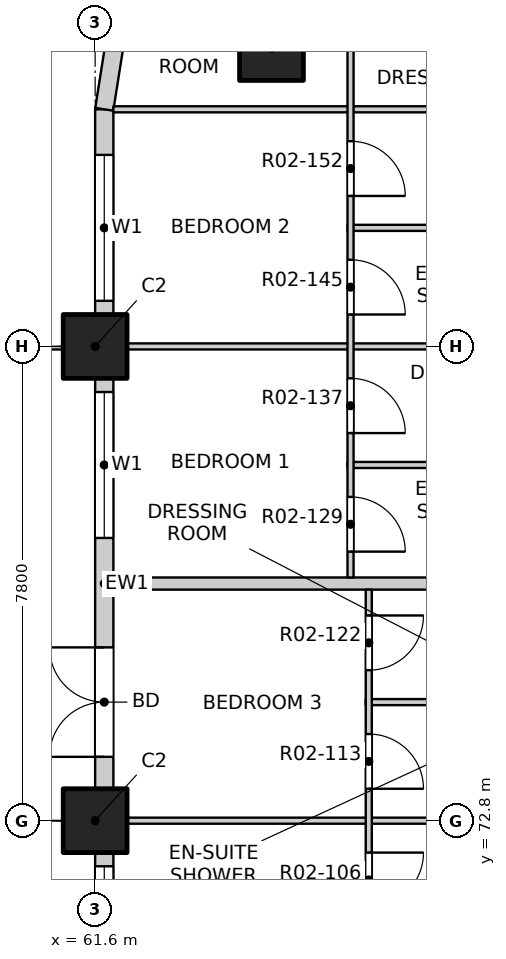
"""IFC4 building model, lengths in metres.
Left out: names, types, materials, properties, quantities, classifications, styles, units other than length and angle.
Written with IfcOpenShell. Run it as: python <this file> out.ifc"""

import sys

from ifc_helpers import new_model, si_unit, direction, frame, frame_2d, origin, origin_2d, place, context, subcontext, project, spatial, rectangle, extrude, element, fill, save


model = new_model("IFC4")
c1 = context("Model", 3, precision=1e-05, world=origin(), true_north=direction((0.0, 1.0)))
c2 = subcontext(c1, "Body", "Model", "MODEL_VIEW")
j1 = project(units=[si_unit("LENGTHUNIT", "METRE"), si_unit("PLANEANGLEUNIT", "RADIAN")], contexts=[c1])
p1 = place(None, origin())
s1 = spatial("IfcSite", under=j1, at=p1, CompositionType="ELEMENT")
p2 = place(p1, origin())
s2 = spatial("IfcBuilding", under=s1, at=p2, CompositionType="ELEMENT")
p3 = place(p2, frame((0.0, 0.0, 29.7)))
s3 = spatial("IfcBuildingStorey", under=s2, at=p3, CompositionType="ELEMENT", Elevation=29.7)
for number, where, z_axis, x_axis in (
    (1, (64.5, 85.5, -0.25), (0.0, 0.0, 1.0), (1.0, 0.0, 0.0)),
    (2, (61.6, 72.8, -0.25), (0.0, 0.0, 1.0), (1.0, 0.0, 0.0)),
    (3, (61.6, 80.6, -0.25), (0.0, 0.0, 1.0), (1.0, 0.0, 0.0)),
):
    element("IfcColumn", number, at=place(p3, frame(where, z_axis=z_axis, x_axis=x_axis)), inside=s3, PredefinedType="COLUMN", context=c2, shape_type="SweptSolid", body=[
        extrude(rectangle(XDim=1.05, YDim=1.05, at=origin_2d()), origin(), (0.0, 0.0, 1.0), 3.4),
    ])
p4 = place(p3, frame((61.75, 65.525, 0.0), z_axis=(0.0, 0.0, 1.0), x_axis=(0.0, 1.0, 0.0)))
e4 = element("IfcWall", 4, at=p4, inside=s3, PredefinedType="SOLIDWALL", context=c2, shape_type="SweptSolid", body=[
    extrude(rectangle(XDim=6.75, YDim=0.3, at=frame_2d((3.375, 0.0))), origin(), (0.0, 0.0, 1.0), 2.7),
])
p5 = place(p4, frame((0.525, 0.0, 0.0)))
e5 = element("IfcOpeningElement", 5, at=p5, cuts=e4, PredefinedType="OPENING", context=c2, shape_type="SweptSolid", body=[
    extrude(rectangle(XDim=1.8, YDim=2.4, at=frame_2d((0.9, 1.2))), frame((0.0, 0.16, 0.0), z_axis=(0.0, -1.0, 0.0), x_axis=(1.0, 0.0, 0.0)), (0.0, 0.0, 1.0), 0.32),
])
p6 = place(p4, frame((4.125, 0.0, 0.9)))
e6 = element("IfcOpeningElement", 6, at=p6, cuts=e4, PredefinedType="OPENING", context=c2, shape_type="SweptSolid", body=[
    extrude(rectangle(XDim=2.4, YDim=1.8, at=frame_2d((1.2, 0.9))), frame((0.0, 0.16, 0.0), z_axis=(0.0, -1.0, 0.0), x_axis=(1.0, 0.0, 0.0)), (0.0, 0.0, 1.0), 0.32),
])
p7 = place(p3, frame((61.75, 73.325, 0.0), z_axis=(0.0, 0.0, 1.0), x_axis=(0.0, 1.0, 0.0)))
e7 = element("IfcWall", 7, at=p7, inside=s3, PredefinedType="SOLIDWALL", context=c2, shape_type="SweptSolid", body=[
    extrude(rectangle(XDim=6.75, YDim=0.3, at=frame_2d((3.375, 0.0))), origin(), (0.0, 0.0, 1.0), 2.7),
])
p8 = place(p7, frame((0.525, 0.0, 0.0)))
e8 = element("IfcOpeningElement", 8, at=p8, cuts=e7, PredefinedType="OPENING", context=c2, shape_type="SweptSolid", body=[
    extrude(rectangle(XDim=1.8, YDim=2.4, at=frame_2d((0.9, 1.2))), frame((0.0, 0.16, 0.0), z_axis=(0.0, -1.0, 0.0), x_axis=(1.0, 0.0, 0.0)), (0.0, 0.0, 1.0), 0.32),
])
p9 = place(p7, frame((4.125, 0.0, 0.9)))
e9 = element("IfcOpeningElement", 9, at=p9, cuts=e7, PredefinedType="OPENING", context=c2, shape_type="SweptSolid", body=[
    extrude(rectangle(XDim=2.4, YDim=1.8, at=frame_2d((1.2, 0.9))), frame((0.0, 0.16, 0.0), z_axis=(0.0, -1.0, 0.0), x_axis=(1.0, 0.0, 0.0)), (0.0, 0.0, 1.0), 0.32),
])
p10 = place(p3, frame((61.75, 81.125, 0.0), z_axis=(0.0, 0.0, 1.0), x_axis=(0.0, 1.0, 0.0)))
e10 = element("IfcWall", 10, at=p10, inside=s3, PredefinedType="SOLIDWALL", context=c2, shape_type="SweptSolid", body=[
    extrude(rectangle(XDim=3.375, YDim=0.3, at=frame_2d((1.688, 0.0))), origin(), (0.0, 0.0, 1.0), 2.7),
])
p11 = place(p10, frame((0.225, 0.0, 0.9)))
e11 = element("IfcOpeningElement", 11, at=p11, cuts=e10, PredefinedType="OPENING", context=c2, shape_type="SweptSolid", body=[
    extrude(rectangle(XDim=2.4, YDim=1.8, at=frame_2d((1.2, 0.9))), frame((0.0, 0.16, 0.0), z_axis=(0.0, -1.0, 0.0), x_axis=(1.0, 0.0, 0.0)), (0.0, 0.0, 1.0), 0.32),
])
p12 = place(p3, frame((61.934, 85.659, 0.0), z_axis=(0.0, 0.0, 1.0), x_axis=(-0.156496880861, -0.987678452879, 0.0)))
e12 = element("IfcWall", 12, at=p12, inside=s3, PredefinedType="SOLIDWALL", context=c2, shape_type="SweptSolid", body=[
    extrude(rectangle(XDim=1.173, YDim=0.3, at=frame_2d((0.586, 0.0))), origin(), (0.0, 0.0, 1.0), 2.7),
])
p13 = place(p3, frame((61.9, 72.8, 0.0), z_axis=(0.0, 0.0, 1.0), x_axis=(1.0, 0.0, 0.0)))
e13 = element("IfcWall", 13, at=p13, inside=s3, PredefinedType="PARTITIONING", context=c2, shape_type="SweptSolid", body=[
    extrude(rectangle(XDim=7.55, YDim=0.1, at=frame_2d((3.775, 0.0))), origin(), (0.0, 0.0, 1.0), 2.55),
])
p14 = place(p3, frame((66.05, 74.75, 0.0), z_axis=(0.0, 0.0, 1.0), x_axis=(1.0, 0.0, 0.0)))
e14 = element("IfcWall", 14, at=p14, inside=s3, PredefinedType="PARTITIONING", context=c2, shape_type="SweptSolid", body=[
    extrude(rectangle(XDim=3.4, YDim=0.1, at=frame_2d((1.7, 0.0))), origin(), (0.0, 0.0, 1.0), 3.15),
])
p15 = place(p3, frame((61.9, 76.7, 0.0), z_axis=(0.0, 0.0, 1.0), x_axis=(1.0, 0.0, 0.0)))
e15 = element("IfcWall", 15, at=p15, inside=s3, PredefinedType="PARTITIONING", context=c2, shape_type="SweptSolid", body=[
    extrude(rectangle(XDim=11.5, YDim=0.2, at=frame_2d((5.75, 0.0))), origin(), (0.0, 0.0, 1.0), 3.15),
])
p16 = place(p3, frame((65.75, 78.65, 0.0), z_axis=(0.0, 0.0, 1.0), x_axis=(1.0, 0.0, 0.0)))
e16 = element("IfcWall", 16, at=p16, inside=s3, PredefinedType="PARTITIONING", context=c2, shape_type="SweptSolid", body=[
    extrude(rectangle(XDim=3.7, YDim=0.1, at=frame_2d((1.85, 0.0))), origin(), (0.0, 0.0, 1.0), 3.15),
])
p17 = place(p3, frame((61.9, 80.6, 0.0), z_axis=(0.0, 0.0, 1.0), x_axis=(1.0, 0.0, 0.0)))
e17 = element("IfcWall", 17, at=p17, inside=s3, PredefinedType="PARTITIONING", context=c2, shape_type="SweptSolid", body=[
    extrude(rectangle(XDim=7.55, YDim=0.1, at=frame_2d((3.775, 0.0))), origin(), (0.0, 0.0, 1.0), 2.55),
])
p18 = place(p3, frame((65.75, 82.55, 0.0), z_axis=(0.0, 0.0, 1.0), x_axis=(1.0, 0.0, 0.0)))
e18 = element("IfcWall", 18, at=p18, inside=s3, PredefinedType="PARTITIONING", context=c2, shape_type="SweptSolid", body=[
    extrude(rectangle(XDim=3.7, YDim=0.1, at=frame_2d((1.85, 0.0))), origin(), (0.0, 0.0, 1.0), 3.15),
])
p19 = place(p3, frame((61.9, 84.5, 0.0), z_axis=(0.0, 0.0, 1.0), x_axis=(1.0, 0.0, 0.0)))
e19 = element("IfcWall", 19, at=p19, inside=s3, PredefinedType="PARTITIONING", context=c2, shape_type="SweptSolid", body=[
    extrude(rectangle(XDim=11.5, YDim=0.1, at=frame_2d((5.75, 0.0))), origin(), (0.0, 0.0, 1.0), 3.15),
])
p20 = place(p19, frame((7.965, 0.0, 0.0)))
e20 = element("IfcOpeningElement", 20, at=p20, cuts=e19, PredefinedType="OPENING", context=c2, shape_type="SweptSolid", body=[
    extrude(rectangle(XDim=0.9, YDim=2.1, at=frame_2d((0.45, 1.05))), frame((0.0, 0.06, 0.0), z_axis=(0.0, -1.0, 0.0), x_axis=(1.0, 0.0, 0.0)), (0.0, 0.0, 1.0), 0.12),
])
p21 = place(p3, frame((65.8, 76.8, 0.0), z_axis=(0.0, 0.0, 1.0), x_axis=(0.0, 1.0, 0.0)))
e21 = element("IfcWall", 21, at=p21, inside=s3, PredefinedType="PARTITIONING", context=c2, shape_type="SweptSolid", body=[
    extrude(rectangle(XDim=11.3, YDim=0.1, at=frame_2d((5.65, 0.0))), origin(), (0.0, 0.0, 1.0), 3.15),
])
p22 = place(p21, frame((0.425, 0.0, 0.0)))
e22 = element("IfcOpeningElement", 22, at=p22, cuts=e21, PredefinedType="OPENING", context=c2, shape_type="SweptSolid", body=[
    extrude(rectangle(XDim=0.9, YDim=2.1, at=frame_2d((0.45, 1.05))), frame((0.0, 0.06, 0.0), z_axis=(0.0, -1.0, 0.0), x_axis=(1.0, 0.0, 0.0)), (0.0, 0.0, 1.0), 0.12),
])
p23 = place(p21, frame((2.375, 0.0, 0.0)))
e23 = element("IfcOpeningElement", 23, at=p23, cuts=e21, PredefinedType="OPENING", context=c2, shape_type="SweptSolid", body=[
    extrude(rectangle(XDim=0.9, YDim=2.1, at=frame_2d((0.45, 1.05))), frame((0.0, 0.06, 0.0), z_axis=(0.0, -1.0, 0.0), x_axis=(1.0, 0.0, 0.0)), (0.0, 0.0, 1.0), 0.12),
])
p24 = place(p21, frame((4.325, 0.0, 0.0)))
e24 = element("IfcOpeningElement", 24, at=p24, cuts=e21, PredefinedType="OPENING", context=c2, shape_type="SweptSolid", body=[
    extrude(rectangle(XDim=0.9, YDim=2.1, at=frame_2d((0.45, 1.05))), frame((0.0, 0.06, 0.0), z_axis=(0.0, -1.0, 0.0), x_axis=(1.0, 0.0, 0.0)), (0.0, 0.0, 1.0), 0.12),
])
p25 = place(p21, frame((6.275, 0.0, 0.0)))
e25 = element("IfcOpeningElement", 25, at=p25, cuts=e21, PredefinedType="OPENING", context=c2, shape_type="SweptSolid", body=[
    extrude(rectangle(XDim=0.9, YDim=2.1, at=frame_2d((0.45, 1.05))), frame((0.0, 0.06, 0.0), z_axis=(0.0, -1.0, 0.0), x_axis=(1.0, 0.0, 0.0)), (0.0, 0.0, 1.0), 0.12),
])
p26 = place(p21, frame((9.05, 0.0, 0.0)))
e26 = element("IfcOpeningElement", 26, at=p26, cuts=e21, PredefinedType="OPENING", context=c2, shape_type="SweptSolid", body=[
    extrude(rectangle(XDim=1.2, YDim=2.1, at=frame_2d((0.6, 1.05))), frame((0.0, 0.06, 0.0), z_axis=(0.0, -1.0, 0.0), x_axis=(1.0, 0.0, 0.0)), (0.0, 0.0, 1.0), 0.12),
])
p27 = place(p3, frame((66.1, 41.9, 0.0), z_axis=(0.0, 0.0, 1.0), x_axis=(0.0, 1.0, 0.0)))
e27 = element("IfcWall", 27, at=p27, inside=s3, PredefinedType="PARTITIONING", context=c2, shape_type="SweptSolid", body=[
    extrude(rectangle(XDim=34.7, YDim=0.1, at=frame_2d((17.35, 0.0))), origin(), (0.0, 0.0, 1.0), 3.15),
])
p28 = place(p27, frame((1.05, 0.0, 0.0)))
e28 = element("IfcOpeningElement", 28, at=p28, cuts=e27, PredefinedType="OPENING", context=c2, shape_type="SweptSolid", body=[
    extrude(rectangle(XDim=1.2, YDim=2.1, at=frame_2d((0.6, 1.05))), frame((0.0, 0.06, 0.0), z_axis=(0.0, -1.0, 0.0), x_axis=(1.0, 0.0, 0.0)), (0.0, 0.0, 1.0), 0.12),
])
p29 = place(p27, frame((4.95, 0.0, 0.0)))
e29 = element("IfcOpeningElement", 29, at=p29, cuts=e27, PredefinedType="OPENING", context=c2, shape_type="SweptSolid", body=[
    extrude(rectangle(XDim=1.2, YDim=2.1, at=frame_2d((0.6, 1.05))), frame((0.0, 0.06, 0.0), z_axis=(0.0, -1.0, 0.0), x_axis=(1.0, 0.0, 0.0)), (0.0, 0.0, 1.0), 0.12),
])
p30 = place(p27, frame((8.025, 0.0, 0.0)))
e30 = element("IfcOpeningElement", 30, at=p30, cuts=e27, PredefinedType="OPENING", context=c2, shape_type="SweptSolid", body=[
    extrude(rectangle(XDim=0.9, YDim=2.1, at=frame_2d((0.45, 1.05))), frame((0.0, 0.06, 0.0), z_axis=(0.0, -1.0, 0.0), x_axis=(1.0, 0.0, 0.0)), (0.0, 0.0, 1.0), 0.12),
])
p31 = place(p27, frame((9.975, 0.0, 0.0)))
e31 = element("IfcOpeningElement", 31, at=p31, cuts=e27, PredefinedType="OPENING", context=c2, shape_type="SweptSolid", body=[
    extrude(rectangle(XDim=0.9, YDim=2.1, at=frame_2d((0.45, 1.05))), frame((0.0, 0.06, 0.0), z_axis=(0.0, -1.0, 0.0), x_axis=(1.0, 0.0, 0.0)), (0.0, 0.0, 1.0), 0.12),
])
p32 = place(p27, frame((12.75, 0.0, 0.0)))
e32 = element("IfcOpeningElement", 32, at=p32, cuts=e27, PredefinedType="OPENING", context=c2, shape_type="SweptSolid", body=[
    extrude(rectangle(XDim=1.2, YDim=2.1, at=frame_2d((0.6, 1.05))), frame((0.0, 0.06, 0.0), z_axis=(0.0, -1.0, 0.0), x_axis=(1.0, 0.0, 0.0)), (0.0, 0.0, 1.0), 0.12),
])
p33 = place(p27, frame((15.825, 0.0, 0.0)))
e33 = element("IfcOpeningElement", 33, at=p33, cuts=e27, PredefinedType="OPENING", context=c2, shape_type="SweptSolid", body=[
    extrude(rectangle(XDim=0.9, YDim=2.1, at=frame_2d((0.45, 1.05))), frame((0.0, 0.06, 0.0), z_axis=(0.0, -1.0, 0.0), x_axis=(1.0, 0.0, 0.0)), (0.0, 0.0, 1.0), 0.12),
])
p34 = place(p27, frame((17.775, 0.0, 0.0)))
e34 = element("IfcOpeningElement", 34, at=p34, cuts=e27, PredefinedType="OPENING", context=c2, shape_type="SweptSolid", body=[
    extrude(rectangle(XDim=0.9, YDim=2.1, at=frame_2d((0.45, 1.05))), frame((0.0, 0.06, 0.0), z_axis=(0.0, -1.0, 0.0), x_axis=(1.0, 0.0, 0.0)), (0.0, 0.0, 1.0), 0.12),
])
p35 = place(p27, frame((19.725, 0.0, 0.0)))
e35 = element("IfcOpeningElement", 35, at=p35, cuts=e27, PredefinedType="OPENING", context=c2, shape_type="SweptSolid", body=[
    extrude(rectangle(XDim=0.9, YDim=2.1, at=frame_2d((0.45, 1.05))), frame((0.0, 0.06, 0.0), z_axis=(0.0, -1.0, 0.0), x_axis=(1.0, 0.0, 0.0)), (0.0, 0.0, 1.0), 0.12),
])
p36 = place(p27, frame((21.675, 0.0, 0.0)))
e36 = element("IfcOpeningElement", 36, at=p36, cuts=e27, PredefinedType="OPENING", context=c2, shape_type="SweptSolid", body=[
    extrude(rectangle(XDim=0.9, YDim=2.1, at=frame_2d((0.45, 1.05))), frame((0.0, 0.06, 0.0), z_axis=(0.0, -1.0, 0.0), x_axis=(1.0, 0.0, 0.0)), (0.0, 0.0, 1.0), 0.12),
])
p37 = place(p27, frame((24.45, 0.0, 0.0)))
e37 = element("IfcOpeningElement", 37, at=p37, cuts=e27, PredefinedType="OPENING", context=c2, shape_type="SweptSolid", body=[
    extrude(rectangle(XDim=1.2, YDim=2.1, at=frame_2d((0.6, 1.05))), frame((0.0, 0.06, 0.0), z_axis=(0.0, -1.0, 0.0), x_axis=(1.0, 0.0, 0.0)), (0.0, 0.0, 1.0), 0.12),
])
p38 = place(p27, frame((27.525, 0.0, 0.0)))
e38 = element("IfcOpeningElement", 38, at=p38, cuts=e27, PredefinedType="OPENING", context=c2, shape_type="SweptSolid", body=[
    extrude(rectangle(XDim=0.9, YDim=2.1, at=frame_2d((0.45, 1.05))), frame((0.0, 0.06, 0.0), z_axis=(0.0, -1.0, 0.0), x_axis=(1.0, 0.0, 0.0)), (0.0, 0.0, 1.0), 0.12),
])
p39 = place(p27, frame((29.475, 0.0, 0.0)))
e39 = element("IfcOpeningElement", 39, at=p39, cuts=e27, PredefinedType="OPENING", context=c2, shape_type="SweptSolid", body=[
    extrude(rectangle(XDim=0.9, YDim=2.1, at=frame_2d((0.45, 1.05))), frame((0.0, 0.06, 0.0), z_axis=(0.0, -1.0, 0.0), x_axis=(1.0, 0.0, 0.0)), (0.0, 0.0, 1.0), 0.12),
])
p40 = place(p27, frame((31.425, 0.0, 0.0)))
e40 = element("IfcOpeningElement", 40, at=p40, cuts=e27, PredefinedType="OPENING", context=c2, shape_type="SweptSolid", body=[
    extrude(rectangle(XDim=0.9, YDim=2.1, at=frame_2d((0.45, 1.05))), frame((0.0, 0.06, 0.0), z_axis=(0.0, -1.0, 0.0), x_axis=(1.0, 0.0, 0.0)), (0.0, 0.0, 1.0), 0.12),
])
p41 = place(p27, frame((33.375, 0.0, 0.0)))
e41 = element("IfcOpeningElement", 41, at=p41, cuts=e27, PredefinedType="OPENING", context=c2, shape_type="SweptSolid", body=[
    extrude(rectangle(XDim=0.9, YDim=2.1, at=frame_2d((0.45, 1.05))), frame((0.0, 0.06, 0.0), z_axis=(0.0, -1.0, 0.0), x_axis=(1.0, 0.0, 0.0)), (0.0, 0.0, 1.0), 0.12),
])
p42 = place(p6, origin())
e42 = element("IfcWindow", 42, at=p42, inside=s3, PartitioningType="DOUBLE_PANEL_VERTICAL", PredefinedType="WINDOW", context=c2, shape_type="SweptSolid", body=[
    extrude(rectangle(XDim=2.4, YDim=1.8, at=frame_2d((1.2, 0.9))), frame((0.0, 0.03, 0.0), z_axis=(0.0, -1.0, 0.0), x_axis=(1.0, 0.0, 0.0)), (0.0, 0.0, 1.0), 0.06),
])
fill(e6, e42)
p43 = place(p8, origin())
e43 = element("IfcDoor", 43, at=p43, inside=s3, OperationType="DOUBLE_DOOR_SINGLE_SWING", PredefinedType="DOOR", context=c2, shape_type="SweptSolid", body=[
    extrude(rectangle(XDim=1.8, YDim=2.4, at=frame_2d((0.9, 1.2))), frame((0.0, 0.025, 0.0), z_axis=(0.0, -1.0, 0.0), x_axis=(1.0, 0.0, 0.0)), (0.0, 0.0, 1.0), 0.05),
])
fill(e8, e43)
p44 = place(p9, origin())
e44 = element("IfcWindow", 44, at=p44, inside=s3, PartitioningType="DOUBLE_PANEL_VERTICAL", PredefinedType="WINDOW", context=c2, shape_type="SweptSolid", body=[
    extrude(rectangle(XDim=2.4, YDim=1.8, at=frame_2d((1.2, 0.9))), frame((0.0, 0.03, 0.0), z_axis=(0.0, -1.0, 0.0), x_axis=(1.0, 0.0, 0.0)), (0.0, 0.0, 1.0), 0.06),
])
fill(e9, e44)
p45 = place(p11, origin())
e45 = element("IfcWindow", 45, at=p45, inside=s3, PartitioningType="DOUBLE_PANEL_VERTICAL", PredefinedType="WINDOW", context=c2, shape_type="SweptSolid", body=[
    extrude(rectangle(XDim=2.4, YDim=1.8, at=frame_2d((1.2, 0.9))), frame((0.0, 0.03, 0.0), z_axis=(0.0, -1.0, 0.0), x_axis=(1.0, 0.0, 0.0)), (0.0, 0.0, 1.0), 0.06),
])
fill(e11, e45)
p46 = place(p39, origin())
e46 = element("IfcDoor", 46, at=p46, inside=s3, OperationType="SINGLE_SWING_LEFT", PredefinedType="DOOR", context=c2, shape_type="SweptSolid", body=[
    extrude(rectangle(XDim=0.9, YDim=2.1, at=frame_2d((0.45, 1.05))), frame((0.0, 0.025, 0.0), z_axis=(0.0, -1.0, 0.0), x_axis=(1.0, 0.0, 0.0)), (0.0, 0.0, 1.0), 0.05),
])
fill(e39, e46)
p47 = place(p40, origin())
e47 = element("IfcDoor", 47, at=p47, inside=s3, OperationType="SINGLE_SWING_RIGHT", PredefinedType="DOOR", context=c2, shape_type="SweptSolid", body=[
    extrude(rectangle(XDim=0.9, YDim=2.1, at=frame_2d((0.45, 1.05))), frame((0.0, 0.025, 0.0), z_axis=(0.0, -1.0, 0.0), x_axis=(1.0, 0.0, 0.0)), (0.0, 0.0, 1.0), 0.05),
])
fill(e40, e47)
p48 = place(p41, origin())
e48 = element("IfcDoor", 48, at=p48, inside=s3, OperationType="SINGLE_SWING_LEFT", PredefinedType="DOOR", context=c2, shape_type="SweptSolid", body=[
    extrude(rectangle(XDim=0.9, YDim=2.1, at=frame_2d((0.45, 1.05))), frame((0.0, 0.025, 0.0), z_axis=(0.0, -1.0, 0.0), x_axis=(1.0, 0.0, 0.0)), (0.0, 0.0, 1.0), 0.05),
])
fill(e41, e48)
p49 = place(p22, origin())
e49 = element("IfcDoor", 49, at=p49, inside=s3, OperationType="SINGLE_SWING_RIGHT", PredefinedType="DOOR", context=c2, shape_type="SweptSolid", body=[
    extrude(rectangle(XDim=0.9, YDim=2.1, at=frame_2d((0.45, 1.05))), frame((0.0, 0.025, 0.0), z_axis=(0.0, -1.0, 0.0), x_axis=(1.0, 0.0, 0.0)), (0.0, 0.0, 1.0), 0.05),
])
fill(e22, e49)
p50 = place(p23, origin())
e50 = element("IfcDoor", 50, at=p50, inside=s3, OperationType="SINGLE_SWING_RIGHT", PredefinedType="DOOR", context=c2, shape_type="SweptSolid", body=[
    extrude(rectangle(XDim=0.9, YDim=2.1, at=frame_2d((0.45, 1.05))), frame((0.0, 0.025, 0.0), z_axis=(0.0, -1.0, 0.0), x_axis=(1.0, 0.0, 0.0)), (0.0, 0.0, 1.0), 0.05),
])
fill(e23, e50)
p51 = place(p24, origin())
e51 = element("IfcDoor", 51, at=p51, inside=s3, OperationType="SINGLE_SWING_RIGHT", PredefinedType="DOOR", context=c2, shape_type="SweptSolid", body=[
    extrude(rectangle(XDim=0.9, YDim=2.1, at=frame_2d((0.45, 1.05))), frame((0.0, 0.025, 0.0), z_axis=(0.0, -1.0, 0.0), x_axis=(1.0, 0.0, 0.0)), (0.0, 0.0, 1.0), 0.05),
])
fill(e24, e51)
p52 = place(p25, origin())
e52 = element("IfcDoor", 52, at=p52, inside=s3, OperationType="SINGLE_SWING_RIGHT", PredefinedType="DOOR", context=c2, shape_type="SweptSolid", body=[
    extrude(rectangle(XDim=0.9, YDim=2.1, at=frame_2d((0.45, 1.05))), frame((0.0, 0.025, 0.0), z_axis=(0.0, -1.0, 0.0), x_axis=(1.0, 0.0, 0.0)), (0.0, 0.0, 1.0), 0.05),
])
fill(e25, e52)
save(model, sys.argv[1])
